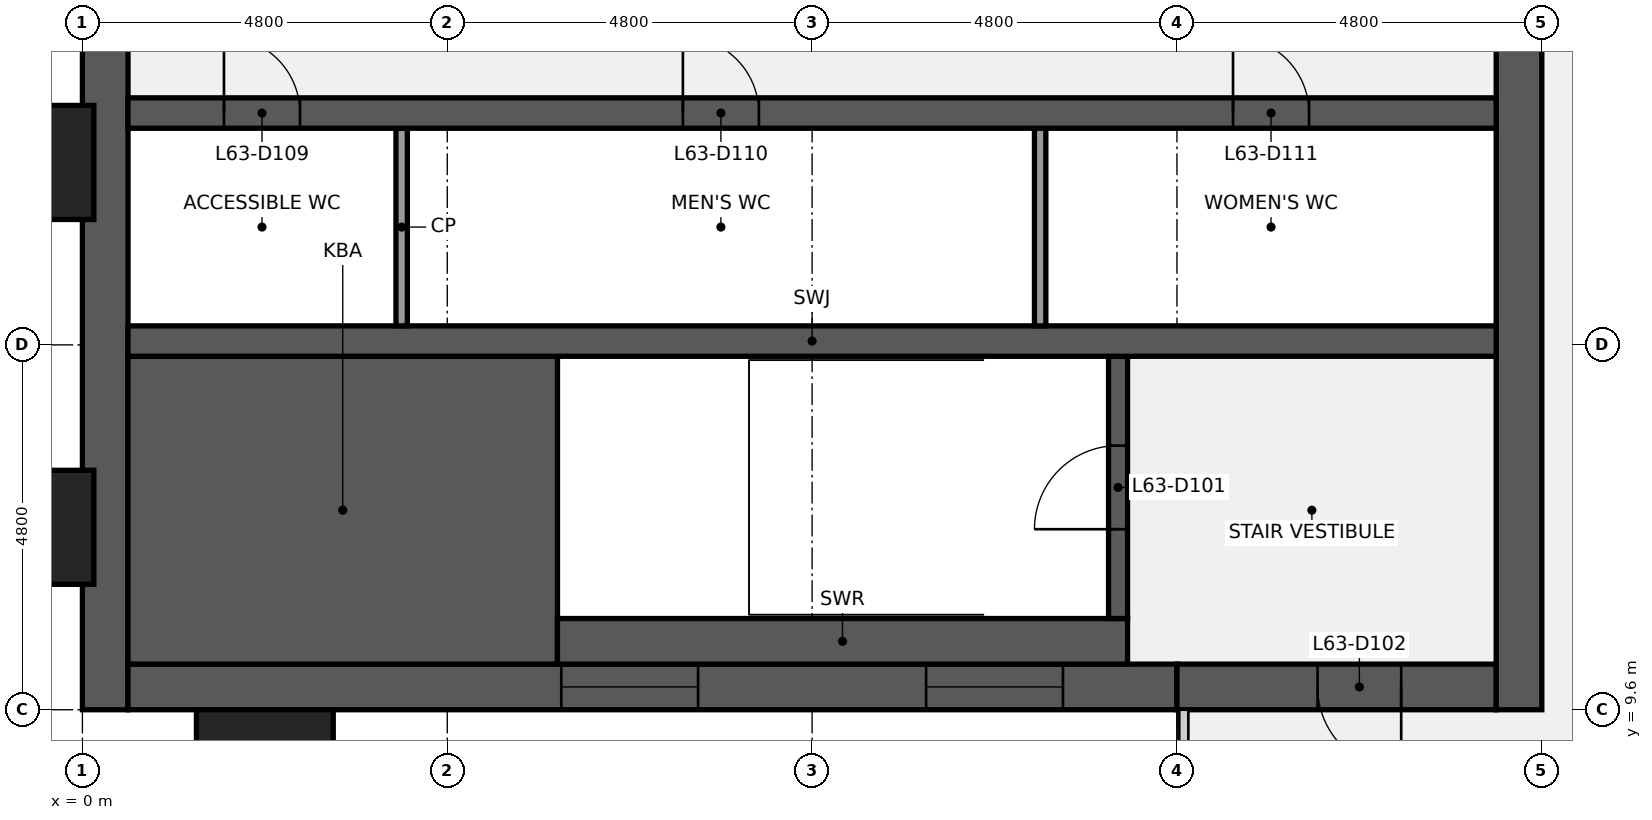
"""IFC4 building model, lengths in metres.
Left out: names, types, materials, properties, quantities, classifications, styles, units other than length and angle.
Written with IfcOpenShell. Run it as: python <this file> out.ifc"""

import sys

from ifc_helpers import new_model, si_unit, direction, frame, frame_2d, origin, origin_2d, place, context, subcontext, project, spatial, rectangle, extrude, element, fill, save


model = new_model("IFC4")
c1 = context("Model", 3, precision=1e-05, world=origin(), true_north=direction((0.0, 1.0)))
c2 = subcontext(c1, "Body", "Model", "MODEL_VIEW")
j1 = project(units=[si_unit("LENGTHUNIT", "METRE"), si_unit("PLANEANGLEUNIT", "RADIAN")], contexts=[c1])
p1 = place(None, origin())
s1 = spatial("IfcSite", under=j1, at=p1, CompositionType="ELEMENT")
p2 = place(p1, origin())
s2 = spatial("IfcBuilding", under=s1, at=p2, CompositionType="ELEMENT")
p3 = place(p2, frame((0.0, 0.0, 290.3)))
s3 = spatial("IfcBuildingStorey", under=s2, at=p3, CompositionType="ELEMENT", Elevation=290.3)
p4 = place(p3, frame((0.3, 9.6, 0.0), z_axis=(0.0, 0.0, 1.0), x_axis=(0.0, 1.0, 0.0)))
e1 = element("IfcWall", 1, at=p4, inside=s3, PredefinedType="SHEAR", context=c2, shape_type="SweptSolid", body=[
    extrude(rectangle(XDim=28.8, YDim=0.6, at=frame_2d((14.4, 0.0))), origin(), (0.0, 0.0, 1.0), 3.84),
])
p5 = place(p4, frame((8.85, 0.0, 0.9)))
e2 = element("IfcOpeningElement", 2, at=p5, cuts=e1, PredefinedType="OPENING", context=c2, shape_type="SweptSolid", body=[
    extrude(rectangle(XDim=1.5, YDim=1.5, at=frame_2d((0.75, 0.75))), frame((0.0, 0.31, 0.0), z_axis=(0.0, -1.0, 0.0), x_axis=(1.0, 0.0, 0.0)), (0.0, 0.0, 1.0), 0.62),
])
p6 = place(p4, frame((18.45, 0.0, 0.9)))
e3 = element("IfcOpeningElement", 3, at=p6, cuts=e1, PredefinedType="OPENING", context=c2, shape_type="SweptSolid", body=[
    extrude(rectangle(XDim=1.5, YDim=1.5, at=frame_2d((0.75, 0.75))), frame((0.0, 0.31, 0.0), z_axis=(0.0, -1.0, 0.0), x_axis=(1.0, 0.0, 0.0)), (0.0, 0.0, 1.0), 0.62),
])
p7 = place(p3, frame((14.4, 9.9, 0.0), z_axis=(0.0, 0.0, 1.0), x_axis=(-1.0, 0.0, 0.0)))
e4 = element("IfcWall", 4, at=p7, inside=s3, PredefinedType="SHEAR", context=c2, shape_type="SweptSolid", body=[
    extrude(rectangle(XDim=13.8, YDim=0.6, at=frame_2d((6.9, 0.0))), origin(), (0.0, 0.0, 1.0), 3.84),
])
p8 = place(p7, frame((6.3, 0.0, 0.9)))
e5 = element("IfcOpeningElement", 5, at=p8, cuts=e4, PredefinedType="OPENING", context=c2, shape_type="SweptSolid", body=[
    extrude(rectangle(XDim=1.8, YDim=1.5, at=frame_2d((0.9, 0.75))), frame((0.0, 0.31, 0.0), z_axis=(0.0, -1.0, 0.0), x_axis=(1.0, 0.0, 0.0)), (0.0, 0.0, 1.0), 0.62),
])
p9 = place(p7, frame((1.5, 0.0, 0.9)))
e6 = element("IfcOpeningElement", 6, at=p9, cuts=e4, PredefinedType="OPENING", context=c2, shape_type="SweptSolid", body=[
    extrude(rectangle(XDim=1.8, YDim=1.5, at=frame_2d((0.9, 0.75))), frame((0.0, 0.31, 0.0), z_axis=(0.0, -1.0, 0.0), x_axis=(1.0, 0.0, 0.0)), (0.0, 0.0, 1.0), 0.62),
])
p10 = place(p3, frame((18.6, 9.9, 0.0), z_axis=(0.0, 0.0, 1.0), x_axis=(-1.0, 0.0, 0.0)))
e7 = element("IfcWall", 7, at=p10, inside=s3, PredefinedType="SHEAR", context=c2, shape_type="SweptSolid", body=[
    extrude(rectangle(XDim=4.2, YDim=0.6, at=frame_2d((2.1, 0.0))), origin(), (0.0, 0.0, 1.0), 3.84),
])
p11 = place(p10, frame((1.25, 0.0, 0.0)))
e8 = element("IfcOpeningElement", 8, at=p11, cuts=e7, PredefinedType="OPENING", context=c2, shape_type="SweptSolid", body=[
    extrude(rectangle(XDim=1.1, YDim=2.1, at=frame_2d((0.55, 1.05))), frame((0.0, 0.31, 0.0), z_axis=(0.0, -1.0, 0.0), x_axis=(1.0, 0.0, 0.0)), (0.0, 0.0, 1.0), 0.62),
])
p12 = place(p3, frame((18.9, 38.4, 0.0), z_axis=(0.0, 0.0, 1.0), x_axis=(0.0, -1.0, 0.0)))
e9 = element("IfcWall", 9, at=p12, inside=s3, PredefinedType="SHEAR", context=c2, shape_type="SweptSolid", body=[
    extrude(rectangle(XDim=28.8, YDim=0.6, at=frame_2d((14.4, 0.0))), origin(), (0.0, 0.0, 1.0), 3.84),
])
p13 = place(p12, frame((18.3, 0.0, 0.0)))
e10 = element("IfcOpeningElement", 10, at=p13, cuts=e9, PredefinedType="OPENING", context=c2, shape_type="SweptSolid", body=[
    extrude(rectangle(XDim=1.8, YDim=2.1, at=frame_2d((0.9, 1.05))), frame((0.0, 0.31, 0.0), z_axis=(0.0, -1.0, 0.0), x_axis=(1.0, 0.0, 0.0)), (0.0, 0.0, 1.0), 0.62),
])
p14 = place(p12, frame((8.7, 0.0, 0.0)))
e11 = element("IfcOpeningElement", 11, at=p14, cuts=e9, PredefinedType="OPENING", context=c2, shape_type="SweptSolid", body=[
    extrude(rectangle(XDim=1.8, YDim=2.1, at=frame_2d((0.9, 1.05))), frame((0.0, 0.31, 0.0), z_axis=(0.0, -1.0, 0.0), x_axis=(1.0, 0.0, 0.0)), (0.0, 0.0, 1.0), 0.62),
])
p15 = place(p3, frame((0.6, 12.225, 0.0), z_axis=(0.0, 0.0, 1.0), x_axis=(1.0, 0.0, 0.0)))
e12 = element("IfcWall", 12, at=p15, inside=s3, PredefinedType="SHEAR", context=c2, shape_type="SweptSolid", body=[
    extrude(rectangle(XDim=5.65, YDim=4.05, at=frame_2d((2.825, 0.0))), origin(), (0.0, 0.0, 1.0), 3.84),
])
p16 = place(p3, frame((6.25, 10.5, 0.0), z_axis=(0.0, 0.0, 1.0), x_axis=(1.0, 0.0, 0.0)))
e13 = element("IfcWall", 13, at=p16, inside=s3, PredefinedType="SHEAR", context=c2, shape_type="SweptSolid", body=[
    extrude(rectangle(XDim=7.5, YDim=0.6, at=frame_2d((3.75, 0.0))), origin(), (0.0, 0.0, 1.0), 3.84),
])
p17 = place(p3, frame((13.625, 10.8, 0.0), z_axis=(0.0, 0.0, 1.0), x_axis=(0.0, 1.0, 0.0)))
e14 = element("IfcWall", 14, at=p17, inside=s3, PredefinedType="SHEAR", context=c2, shape_type="SweptSolid", body=[
    extrude(rectangle(XDim=3.45, YDim=0.25, at=frame_2d((1.725, 0.0))), origin(), (0.0, 0.0, 1.0), 3.84),
])
p18 = place(p17, frame((1.175, 0.0, 0.0)))
e15 = element("IfcOpeningElement", 15, at=p18, cuts=e14, PredefinedType="OPENING", context=c2, shape_type="SweptSolid", body=[
    extrude(rectangle(XDim=1.1, YDim=2.1, at=frame_2d((0.55, 1.05))), frame((0.0, 0.135, 0.0), z_axis=(0.0, -1.0, 0.0), x_axis=(1.0, 0.0, 0.0)), (0.0, 0.0, 1.0), 0.27),
])
p19 = place(p3, frame((0.6, 14.45, 0.0), z_axis=(0.0, 0.0, 1.0), x_axis=(1.0, 0.0, 0.0)))
e16 = element("IfcWall", 16, at=p19, inside=s3, PredefinedType="SHEAR", context=c2, shape_type="SweptSolid", body=[
    extrude(rectangle(XDim=18.0, YDim=0.4, at=frame_2d((9.0, 0.0))), origin(), (0.0, 0.0, 1.0), 3.84),
])
for number, where, z_axis, x_axis in (
    (17, (4.2, 14.65, 0.0), (0.0, 0.0, 1.0), (0.0, 1.0, 0.0)),
    (18, (12.6, 14.65, 0.0), (0.0, 0.0, 1.0), (0.0, 1.0, 0.0)),
):
    element("IfcWall", number, at=place(p3, frame(where, z_axis=z_axis, x_axis=x_axis)), inside=s3, PredefinedType="PARTITIONING", context=c2, shape_type="SweptSolid", body=[
        extrude(rectangle(XDim=2.6, YDim=0.15, at=frame_2d((1.3, 0.0))), origin(), (0.0, 0.0, 1.0), 3.84),
    ])
p20 = place(p3, frame((0.6, 17.45, 0.0), z_axis=(0.0, 0.0, 1.0), x_axis=(1.0, 0.0, 0.0)))
e19 = element("IfcWall", 19, at=p20, inside=s3, PredefinedType="SHEAR", context=c2, shape_type="SweptSolid", body=[
    extrude(rectangle(XDim=18.0, YDim=0.4, at=frame_2d((9.0, 0.0))), origin(), (0.0, 0.0, 1.0), 3.84),
])
p21 = place(p20, frame((1.262, 0.0, 0.0)))
e20 = element("IfcOpeningElement", 20, at=p21, cuts=e19, PredefinedType="OPENING", context=c2, shape_type="SweptSolid", body=[
    extrude(rectangle(XDim=1.0, YDim=2.1, at=frame_2d((0.5, 1.05))), frame((0.0, 0.21, 0.0), z_axis=(0.0, -1.0, 0.0), x_axis=(1.0, 0.0, 0.0)), (0.0, 0.0, 1.0), 0.42),
])
p22 = place(p20, frame((7.3, 0.0, 0.0)))
e21 = element("IfcOpeningElement", 21, at=p22, cuts=e19, PredefinedType="OPENING", context=c2, shape_type="SweptSolid", body=[
    extrude(rectangle(XDim=1.0, YDim=2.1, at=frame_2d((0.5, 1.05))), frame((0.0, 0.21, 0.0), z_axis=(0.0, -1.0, 0.0), x_axis=(1.0, 0.0, 0.0)), (0.0, 0.0, 1.0), 0.42),
])
p23 = place(p20, frame((14.538, 0.0, 0.0)))
e22 = element("IfcOpeningElement", 22, at=p23, cuts=e19, PredefinedType="OPENING", context=c2, shape_type="SweptSolid", body=[
    extrude(rectangle(XDim=1.0, YDim=2.1, at=frame_2d((0.5, 1.05))), frame((0.0, 0.21, 0.0), z_axis=(0.0, -1.0, 0.0), x_axis=(1.0, 0.0, 0.0)), (0.0, 0.0, 1.0), 0.42),
])
for number, where, z_axis, x_axis in (
    (23, (-0.75, 12.0, 0.0), (0.0, 0.0, 1.0), (0.0, 1.0, 0.0)),
    (24, (-0.75, 16.8, 0.0), (0.0, 0.0, 1.0), (0.0, 1.0, 0.0)),
    (25, (2.4, 8.85, 0.0), (0.0, 0.0, 1.0), (1.0, 0.0, 0.0)),
):
    element("IfcColumn", number, at=place(p3, frame(where, z_axis=z_axis, x_axis=x_axis)), inside=s3, PredefinedType="PILASTER", context=c2, shape_type="SweptSolid", body=[
        extrude(rectangle(XDim=1.8, YDim=1.5, at=origin_2d()), origin(), (0.0, 0.0, 1.0), 4.0),
    ])
p24 = place(p18, origin())
e26 = element("IfcDoor", 26, at=p24, inside=s3, OperationType="SINGLE_SWING_LEFT", PredefinedType="DOOR", context=c2, shape_type="SweptSolid", body=[
    extrude(rectangle(XDim=1.1, YDim=2.1, at=frame_2d((0.55, 1.05))), frame((0.0, 0.025, 0.0), z_axis=(0.0, -1.0, 0.0), x_axis=(1.0, 0.0, 0.0)), (0.0, 0.0, 1.0), 0.05),
])
fill(e15, e26)
p25 = place(p11, origin())
e27 = element("IfcDoor", 27, at=p25, inside=s3, OperationType="SINGLE_SWING_LEFT", PredefinedType="DOOR", context=c2, shape_type="SweptSolid", body=[
    extrude(rectangle(XDim=1.1, YDim=2.1, at=frame_2d((0.55, 1.05))), frame((0.0, 0.025, 0.0), z_axis=(0.0, -1.0, 0.0), x_axis=(1.0, 0.0, 0.0)), (0.0, 0.0, 1.0), 0.05),
])
fill(e8, e27)
p26 = place(p21, origin())
e28 = element("IfcDoor", 28, at=p26, inside=s3, OperationType="SINGLE_SWING_LEFT", PredefinedType="DOOR", context=c2, shape_type="SweptSolid", body=[
    extrude(rectangle(XDim=1.0, YDim=2.1, at=frame_2d((0.5, 1.05))), frame((0.0, 0.025, 0.0), z_axis=(0.0, -1.0, 0.0), x_axis=(1.0, 0.0, 0.0)), (0.0, 0.0, 1.0), 0.05),
])
fill(e20, e28)
p27 = place(p22, origin())
e29 = element("IfcDoor", 29, at=p27, inside=s3, OperationType="SINGLE_SWING_LEFT", PredefinedType="DOOR", context=c2, shape_type="SweptSolid", body=[
    extrude(rectangle(XDim=1.0, YDim=2.1, at=frame_2d((0.5, 1.05))), frame((0.0, 0.025, 0.0), z_axis=(0.0, -1.0, 0.0), x_axis=(1.0, 0.0, 0.0)), (0.0, 0.0, 1.0), 0.05),
])
fill(e21, e29)
p28 = place(p23, origin())
e30 = element("IfcDoor", 30, at=p28, inside=s3, OperationType="SINGLE_SWING_LEFT", PredefinedType="DOOR", context=c2, shape_type="SweptSolid", body=[
    extrude(rectangle(XDim=1.0, YDim=2.1, at=frame_2d((0.5, 1.05))), frame((0.0, 0.025, 0.0), z_axis=(0.0, -1.0, 0.0), x_axis=(1.0, 0.0, 0.0)), (0.0, 0.0, 1.0), 0.05),
])
fill(e22, e30)
p29 = place(p8, origin())
e31 = element("IfcWindow", 31, at=p29, inside=s3, PartitioningType="SINGLE_PANEL", PredefinedType="WINDOW", context=c2, shape_type="SweptSolid", body=[
    extrude(rectangle(XDim=1.8, YDim=1.5, at=frame_2d((0.9, 0.75))), frame((0.0, 0.03, 0.0), z_axis=(0.0, -1.0, 0.0), x_axis=(1.0, 0.0, 0.0)), (0.0, 0.0, 1.0), 0.06),
])
fill(e5, e31)
p30 = place(p9, origin())
e32 = element("IfcWindow", 32, at=p30, inside=s3, PartitioningType="SINGLE_PANEL", PredefinedType="WINDOW", context=c2, shape_type="SweptSolid", body=[
    extrude(rectangle(XDim=1.8, YDim=1.5, at=frame_2d((0.9, 0.75))), frame((0.0, 0.03, 0.0), z_axis=(0.0, -1.0, 0.0), x_axis=(1.0, 0.0, 0.0)), (0.0, 0.0, 1.0), 0.06),
])
fill(e6, e32)
save(model, sys.argv[1])
